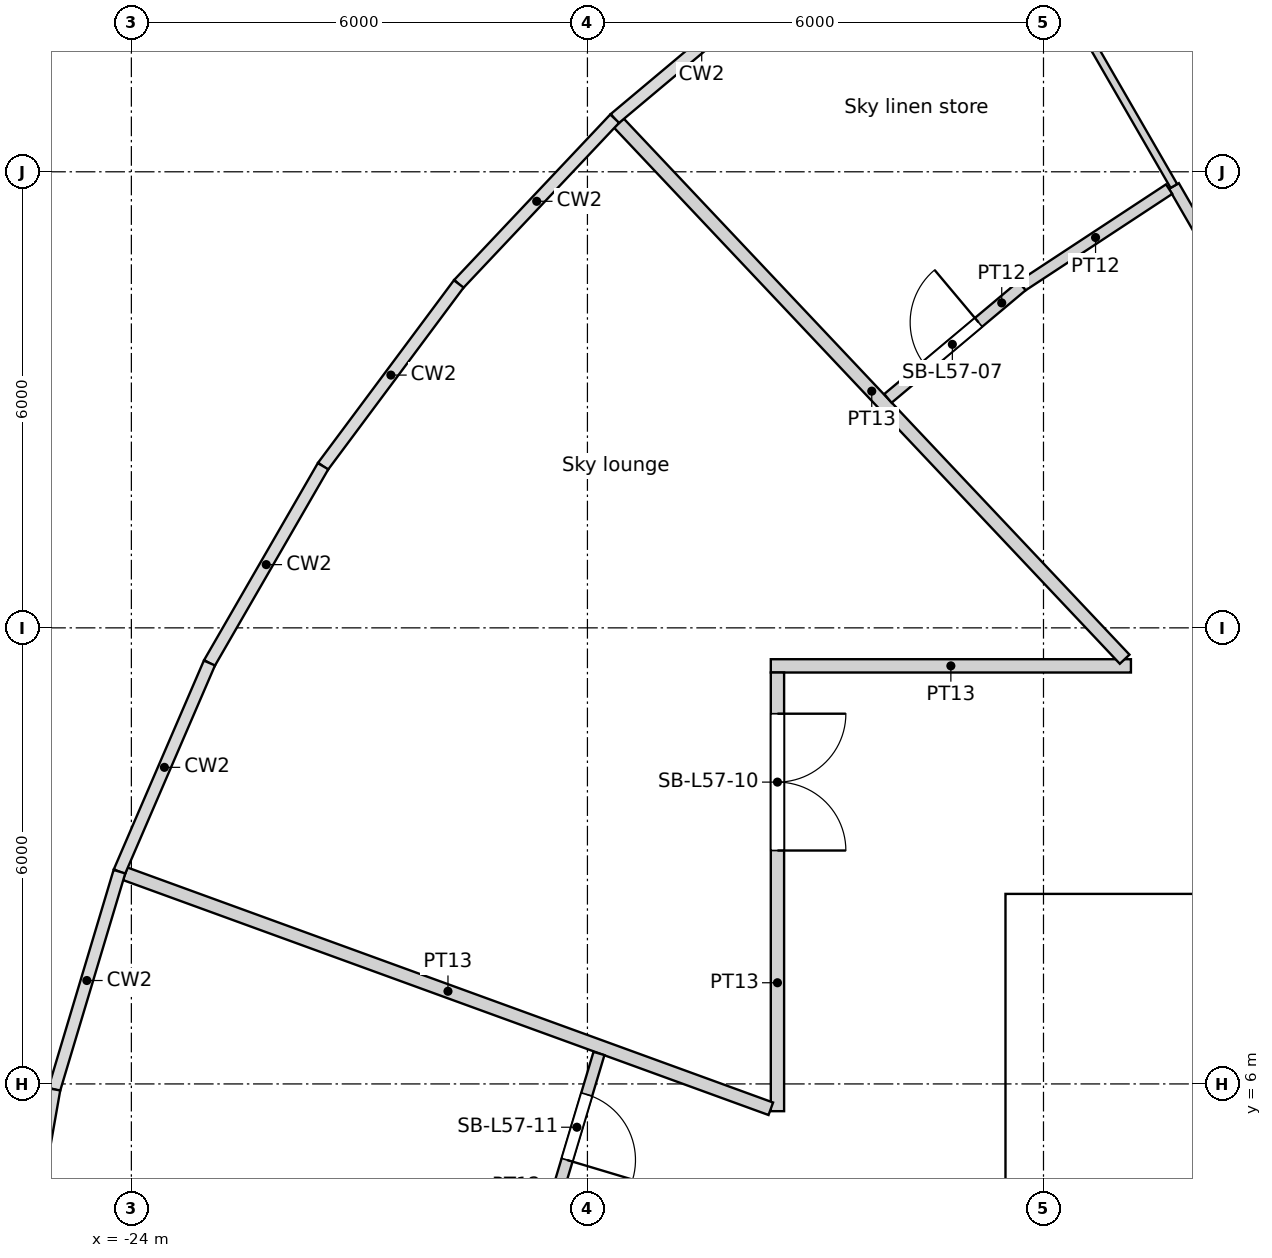
"""IFC4 building model, lengths in metres.
Left out: names, types, materials, properties, quantities, classifications, styles, units other than length and angle.
Written with IfcOpenShell. Run it as: python <this file> out.ifc"""

import sys

from ifc_helpers import new_model, si_unit, direction, frame, frame_2d, origin, origin_2d, place, context, subcontext, project, spatial, rectangle, circle, extrude, element, fill, save


model = new_model("IFC4")
c1 = context("Model", 3, precision=1e-05, world=origin(), true_north=direction((0.0, 1.0)))
c2 = subcontext(c1, "Body", "Model", "MODEL_VIEW")
j1 = project(units=[si_unit("LENGTHUNIT", "METRE"), si_unit("PLANEANGLEUNIT", "RADIAN")], contexts=[c1])
p1 = place(None, origin())
s1 = spatial("IfcSite", under=j1, at=p1, CompositionType="ELEMENT")
p2 = place(p1, origin())
s2 = spatial("IfcBuilding", under=s1, at=p2, CompositionType="ELEMENT")
p3 = place(p2, frame((0.0, 0.0, 219.6)))
s3 = spatial("IfcBuildingStorey", under=s2, at=p3, CompositionType="ELEMENT", Elevation=219.6)
for number, where, z_axis, x_axis in (
    (1, (-16.846, 17.855, 0.0), (0.0, 0.0, 1.0), (1.0, 0.0, 0.0)),
    (2, (-20.509, 13.489, 0.0), (0.0, 0.0, 1.0), (1.0, 0.0, 0.0)),
    (3, (-23.067, 8.396, 0.0), (0.0, 0.0, 1.0), (1.0, 0.0, 0.0)),
):
    element("IfcColumn", number, at=place(p3, frame(where, z_axis=z_axis, x_axis=x_axis)), inside=s3, PredefinedType="COLUMN", context=c2, shape_type="SweptSolid", body=[
        extrude(circle(Radius=0.6, at=origin_2d()), origin(), (0.0, 0.0, 1.0), 5.4),
    ])
for number, where, z_axis, x_axis in (
    (4, (-9.411, 16.301, 0.0), (0.0, 0.0, 1.0), (1.0, 0.0, 0.0)),
    (5, (-13.798, 12.802, 0.0), (0.0, 0.0, 1.0), (1.0, 0.0, 0.0)),
    (6, (-16.958, 8.167, 0.0), (0.0, 0.0, 1.0), (1.0, 0.0, 0.0)),
):
    element("IfcColumn", number, at=place(p3, frame(where, z_axis=z_axis, x_axis=x_axis)), inside=s3, PredefinedType="COLUMN", context=c2, shape_type="SweptSolid", body=[
        extrude(circle(Radius=0.65, at=origin_2d()), origin(), (0.0, 0.0, 1.0), 5.4),
    ])
p4 = place(p3, frame((-12.5, 8.05, 0.0), z_axis=(0.0, 0.0, 1.0), x_axis=(1.0, 0.0, 0.0)))
e7 = element("IfcWall", 7, at=p4, inside=s3, PredefinedType="SOLIDWALL", context=c2, shape_type="SweptSolid", body=[
    extrude(rectangle(XDim=25.0, YDim=0.9, at=frame_2d((12.5, 0.0))), origin(), (0.0, 0.0, 1.0), 5.4),
])
p5 = place(p4, frame((8.3, 0.0, 0.0)))
e8 = element("IfcOpeningElement", 8, at=p5, cuts=e7, PredefinedType="OPENING", context=c2, shape_type="SweptSolid", body=[
    extrude(rectangle(XDim=1.8, YDim=2.1, at=frame_2d((0.9, 1.05))), frame((0.0, 0.45, 0.0), z_axis=(0.0, -1.0, 0.0), x_axis=(1.0, 0.0, 0.0)), (0.0, 0.0, 1.0), 0.9),
])
p6 = place(p3, frame((-12.05, -7.6, 0.0), z_axis=(0.0, 0.0, 1.0), x_axis=(0.0, 1.0, 0.0)))
e9 = element("IfcWall", 9, at=p6, inside=s3, PredefinedType="SOLIDWALL", context=c2, shape_type="SweptSolid", body=[
    extrude(rectangle(XDim=15.2, YDim=0.9, at=frame_2d((7.6, 0.0))), origin(), (0.0, 0.0, 1.0), 5.4),
])
p7 = place(p6, frame((7.1, 0.0, 0.0)))
e10 = element("IfcOpeningElement", 10, at=p7, cuts=e9, PredefinedType="OPENING", context=c2, shape_type="SweptSolid", body=[
    extrude(rectangle(XDim=1.0, YDim=2.1, at=frame_2d((0.5, 1.05))), frame((0.0, 0.45, 0.0), z_axis=(0.0, -1.0, 0.0), x_axis=(1.0, 0.0, 0.0)), (0.0, 0.0, 1.0), 0.9),
])
p8 = place(p3, frame((-24.082, 8.765, 0.0), z_axis=(0.0, 0.0, 1.0), x_axis=(0.939689290675, -0.342029292591, 0.0)))
e11 = element("IfcWall", 11, at=p8, inside=s3, PredefinedType="PARTITIONING", context=c2, shape_type="SweptSolid", body=[
    extrude(rectangle(XDim=9.04, YDim=0.175, at=frame_2d((4.52, 0.0))), origin(), (0.0, 0.0, 1.0), 4.1),
])
p9 = place(p3, frame((-18.455, 4.374, 0.0), z_axis=(0.0, 0.0, 1.0), x_axis=(0.286754978778, 0.95800395727, 0.0)))
e12 = element("IfcWall", 12, at=p9, inside=s3, PredefinedType="PARTITIONING", context=c2, shape_type="SweptSolid", body=[
    extrude(rectangle(XDim=2.116, YDim=0.15, at=frame_2d((1.058, 0.0))), origin(), (0.0, 0.0, 1.0), 4.1),
])
p10 = place(p9, frame((0.653, 0.0, 0.0)))
e13 = element("IfcOpeningElement", 13, at=p10, cuts=e12, PredefinedType="OPENING", context=c2, shape_type="SweptSolid", body=[
    extrude(rectangle(XDim=0.9, YDim=2.1, at=frame_2d((0.45, 1.05))), frame((0.0, 0.075, 0.0), z_axis=(0.0, -1.0, 0.0), x_axis=(1.0, 0.0, 0.0)), (0.0, 0.0, 1.0), 0.15),
])
p11 = place(p3, frame((-17.587, 18.641, 0.0), z_axis=(0.0, 0.0, 1.0), x_axis=(0.686237518372, -0.727377528096, 0.0)))
e14 = element("IfcWall", 14, at=p11, inside=s3, PredefinedType="PARTITIONING", context=c2, shape_type="SweptSolid", body=[
    extrude(rectangle(XDim=9.697, YDim=0.175, at=frame_2d((4.848, 0.0))), origin(), (0.0, 0.0, 1.0), 4.1),
])
p12 = place(p3, frame((-15.5, 5.642, 0.0), z_axis=(0.0, 0.0, 1.0), x_axis=(0.0, 1.0, 0.0)))
e15 = element("IfcWall", 15, at=p12, inside=s3, PredefinedType="PARTITIONING", context=c2, shape_type="SweptSolid", body=[
    extrude(rectangle(XDim=5.771, YDim=0.175, at=frame_2d((2.885, 0.0))), origin(), (0.0, 0.0, 1.0), 4.1),
])
p13 = place(p12, frame((3.429, 0.0, 0.0)))
e16 = element("IfcOpeningElement", 16, at=p13, cuts=e15, PredefinedType="OPENING", context=c2, shape_type="SweptSolid", body=[
    extrude(rectangle(XDim=1.8, YDim=2.4, at=frame_2d((0.9, 1.2))), frame((0.0, 0.087, 0.0), z_axis=(0.0, -1.0, 0.0), x_axis=(1.0, 0.0, 0.0)), (0.0, 0.0, 1.0), 0.175),
])
p14 = place(p3, frame((-12.814, 22.194, 0.0), z_axis=(0.0, 0.0, 1.0), x_axis=(0.499980071345, -0.866036909293, 0.0)))
e17 = element("IfcWall", 17, at=p14, inside=s3, PredefinedType="PARTITIONING", context=c2, shape_type="SweptSolid", body=[
    extrude(rectangle(XDim=5.059, YDim=0.1, at=frame_2d((2.529, 0.0))), origin(), (0.0, 0.0, 1.0), 4.1),
])
p15 = place(p3, frame((-14.046, 15.019, 0.0), z_axis=(0.0, 0.0, 1.0), x_axis=(0.765982646315, 0.642861249061, 0.0)))
e18 = element("IfcWall", 18, at=p15, inside=s3, PredefinedType="PARTITIONING", context=c2, shape_type="SweptSolid", body=[
    extrude(rectangle(XDim=2.302, YDim=0.15, at=frame_2d((1.151, 0.0))), origin(), (0.0, 0.0, 1.0), 4.1),
])
p16 = place(p15, frame((0.656, 0.0, 0.0)))
e19 = element("IfcOpeningElement", 19, at=p16, cuts=e18, PredefinedType="OPENING", context=c2, shape_type="SweptSolid", body=[
    extrude(rectangle(XDim=0.9, YDim=2.1, at=frame_2d((0.45, 1.05))), frame((0.0, 0.075, 0.0), z_axis=(0.0, -1.0, 0.0), x_axis=(1.0, 0.0, 0.0)), (0.0, 0.0, 1.0), 0.15),
])
p17 = place(p3, frame((-10.85, 11.5, 0.0), z_axis=(0.0, 0.0, 1.0), x_axis=(-1.0, 0.0, 0.0)))
e20 = element("IfcWall", 20, at=p17, inside=s3, PredefinedType="PARTITIONING", context=c2, shape_type="SweptSolid", body=[
    extrude(rectangle(XDim=4.738, YDim=0.175, at=frame_2d((2.369, 0.0))), origin(), (0.0, 0.0, 1.0), 4.1),
])
p18 = place(p3, frame((-10.347, 17.772, 0.0), z_axis=(0.0, 0.0, 1.0), x_axis=(-0.835535478461, -0.549436496998, 0.0)))
e21 = element("IfcWall", 21, at=p18, inside=s3, PredefinedType="PARTITIONING", context=c2, shape_type="SweptSolid", body=[
    extrude(rectangle(XDim=2.317, YDim=0.15, at=frame_2d((1.158, 0.0))), origin(), (0.0, 0.0, 1.0), 4.1),
])
p19 = place(p3, frame((-10.284, 17.813, 0.0), z_axis=(0.0, 0.0, 1.0), x_axis=(0.500109828528, -0.865961984968, 0.0)))
e22 = element("IfcWall", 22, at=p19, inside=s3, PredefinedType="PARTITIONING", context=c2, shape_type="SweptSolid", body=[
    extrude(rectangle(XDim=1.528, YDim=0.15, at=frame_2d((0.764, 0.0))), origin(), (0.0, 0.0, 1.0), 4.1),
])
p20 = place(p16, origin())
e23 = element("IfcDoor", 23, at=p20, inside=s3, OperationType="SINGLE_SWING_RIGHT", PredefinedType="DOOR", context=c2, shape_type="SweptSolid", body=[
    extrude(rectangle(XDim=0.9, YDim=2.1, at=frame_2d((0.45, 1.05))), frame((0.0, 0.025, 0.0), z_axis=(0.0, -1.0, 0.0), x_axis=(1.0, 0.0, 0.0)), (0.0, 0.0, 1.0), 0.05),
])
fill(e19, e23)
p21 = place(p13, origin())
e24 = element("IfcDoor", 24, at=p21, inside=s3, OperationType="DOUBLE_DOOR_SINGLE_SWING", PredefinedType="DOOR", context=c2, shape_type="SweptSolid", body=[
    extrude(rectangle(XDim=1.8, YDim=2.4, at=frame_2d((0.9, 1.2))), frame((0.0, 0.025, 0.0), z_axis=(0.0, -1.0, 0.0), x_axis=(1.0, 0.0, 0.0)), (0.0, 0.0, 1.0), 0.05),
])
fill(e16, e24)
p22 = place(p10, origin())
e25 = element("IfcDoor", 25, at=p22, inside=s3, OperationType="SINGLE_SWING_RIGHT", PredefinedType="DOOR", context=c2, shape_type="SweptSolid", body=[
    extrude(rectangle(XDim=0.9, YDim=2.1, at=frame_2d((0.45, 1.05))), frame((0.0, 0.025, 0.0), z_axis=(0.0, -1.0, 0.0), x_axis=(1.0, 0.0, 0.0)), (0.0, 0.0, 1.0), 0.05),
])
fill(e13, e25)
save(model, sys.argv[1])
